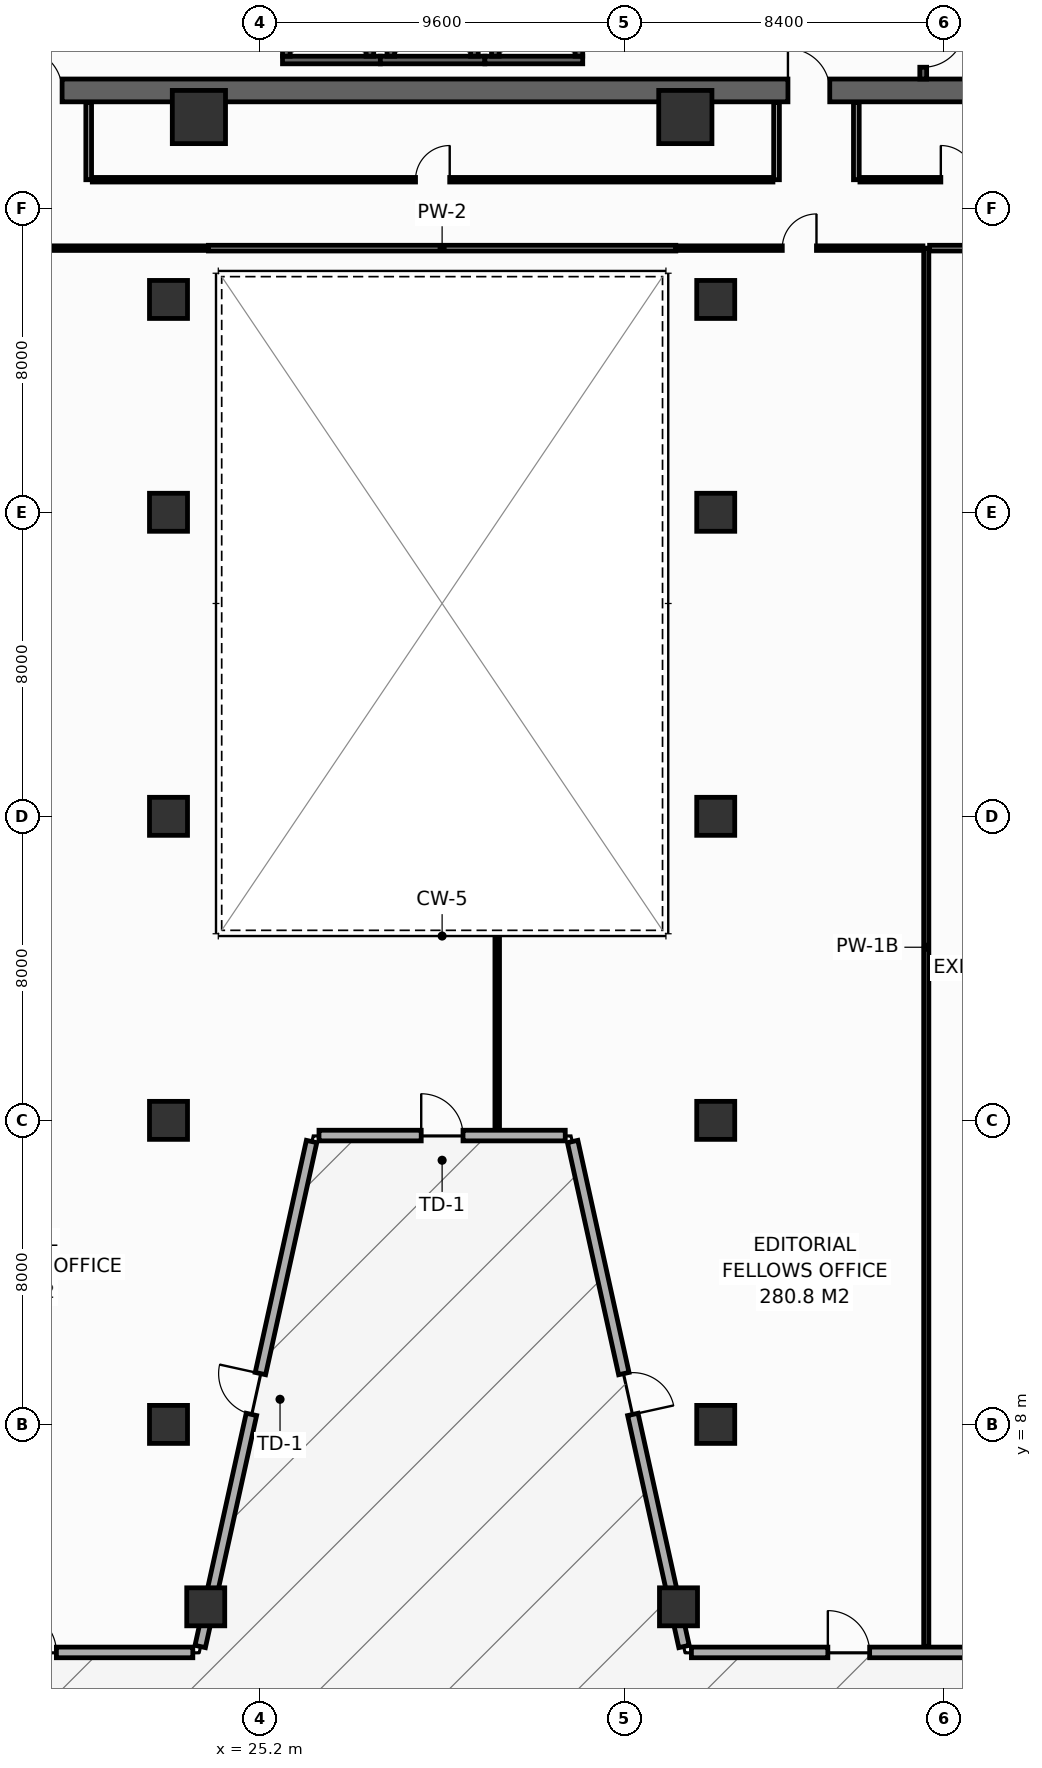
"""IFC4 building model, lengths in metres.
Left out: names, types, materials, properties, quantities, classifications, styles, units other than length and angle.
Written with IfcOpenShell. Run it as: python <this file> out.ifc"""

import sys

from ifc_helpers import new_model, si_unit, direction, frame, frame_2d, origin, origin_2d, place, context, subcontext, project, spatial, rectangle, hollow_rectangle, extrude, element, fill, save


model = new_model("IFC4")
c1 = context("Model", 3, precision=1e-05, world=origin(), true_north=direction((0.0, 1.0)))
c2 = subcontext(c1, "Body", "Model", "MODEL_VIEW")
j1 = project(units=[si_unit("LENGTHUNIT", "METRE"), si_unit("PLANEANGLEUNIT", "RADIAN")], contexts=[c1])
p1 = place(None, origin())
s1 = spatial("IfcSite", under=j1, at=p1, CompositionType="ELEMENT")
p2 = place(p1, origin())
s2 = spatial("IfcBuilding", under=s1, at=p2, CompositionType="ELEMENT")
p3 = place(p2, frame((0.0, 0.0, 27.6)))
s3 = spatial("IfcBuildingStorey", under=s2, at=p3, CompositionType="ELEMENT", Elevation=27.6)
p4 = place(p3, frame((13.5, 43.1, 0.0), z_axis=(0.0, 0.0, 1.0), x_axis=(1.0, 0.0, 0.0)))
e1 = element("IfcWall", 1, at=p4, inside=s3, PredefinedType="SHEAR", context=c2, shape_type="SweptSolid", body=[
    extrude(rectangle(XDim=32.9, YDim=0.6, at=frame_2d((16.45, 0.0))), origin(), (0.0, 0.0, 1.0), 5.15),
])
p5 = place(p4, frame((5.4, 0.0, 0.0)))
e2 = element("IfcOpeningElement", 2, at=p5, cuts=e1, PredefinedType="OPENING", context=c2, shape_type="SweptSolid", body=[
    extrude(rectangle(XDim=1.1, YDim=2.15, at=frame_2d((0.55, 1.075))), frame((0.0, 0.31, 0.0), z_axis=(0.0, -1.0, 0.0), x_axis=(1.0, 0.0, 0.0)), (0.0, 0.0, 1.0), 0.62),
])
p6 = place(p4, frame((25.6, 0.0, 0.0)))
e3 = element("IfcOpeningElement", 3, at=p6, cuts=e1, PredefinedType="OPENING", context=c2, shape_type="SweptSolid", body=[
    extrude(rectangle(XDim=1.1, YDim=2.15, at=frame_2d((0.55, 1.075))), frame((0.0, 0.31, 0.0), z_axis=(0.0, -1.0, 0.0), x_axis=(1.0, 0.0, 0.0)), (0.0, 0.0, 1.0), 0.62),
])
for number, where, z_axis, x_axis in (
    (4, (23.6, 42.4, 0.0), (0.0, 0.0, 1.0), (1.0, 0.0, 0.0)),
    (5, (36.4, 42.4, 0.0), (0.0, 0.0, 1.0), (1.0, 0.0, 0.0)),
):
    element("IfcColumn", number, at=place(p3, frame(where, z_axis=z_axis, x_axis=x_axis)), inside=s3, PredefinedType="COLUMN", context=c2, shape_type="SweptSolid", body=[
        extrude(hollow_rectangle(XDim=1.4, YDim=1.4, WallThickness=0.065, at=origin_2d()), origin(), (0.0, 0.0, 1.0), 5.4),
    ])
for number, where, z_axis, x_axis in (
    (6, (23.78, 3.2, 0.0), (0.0, 0.0, 1.0), (1.0, 0.0, 0.0)),
    (7, (36.22, 3.2, 0.0), (0.0, 0.0, 1.0), (1.0, 0.0, 0.0)),
    (8, (22.8, 8.0, 0.0), (0.0, 0.0, 1.0), (1.0, 0.0, 0.0)),
    (9, (37.2, 8.0, 0.0), (0.0, 0.0, 1.0), (1.0, 0.0, 0.0)),
    (10, (22.8, 16.0, 0.0), (0.0, 0.0, 1.0), (1.0, 0.0, 0.0)),
    (11, (37.2, 16.0, 0.0), (0.0, 0.0, 1.0), (1.0, 0.0, 0.0)),
    (12, (22.8, 24.0, 0.0), (0.0, 0.0, 1.0), (1.0, 0.0, 0.0)),
    (13, (37.2, 24.0, 0.0), (0.0, 0.0, 1.0), (1.0, 0.0, 0.0)),
    (14, (22.8, 32.0, 0.0), (0.0, 0.0, 1.0), (1.0, 0.0, 0.0)),
    (15, (37.2, 32.0, 0.0), (0.0, 0.0, 1.0), (1.0, 0.0, 0.0)),
    (16, (22.8, 37.6, 0.0), (0.0, 0.0, 1.0), (1.0, 0.0, 0.0)),
    (17, (37.2, 37.6, 0.0), (0.0, 0.0, 1.0), (1.0, 0.0, 0.0)),
):
    element("IfcColumn", number, at=place(p3, frame(where, z_axis=z_axis, x_axis=x_axis)), inside=s3, PredefinedType="COLUMN", context=c2, shape_type="SweptSolid", body=[
        extrude(hollow_rectangle(XDim=1.0, YDim=1.0, WallThickness=0.045, at=origin_2d()), origin(), (0.0, 0.0, 1.0), 5.4),
    ])
p7 = place(p3, frame((25.8, 43.9, 0.0), z_axis=(0.0, 0.0, 1.0), x_axis=(1.0, 0.0, 0.0)))
e18 = element("IfcWall", 18, at=p7, inside=s3, PredefinedType="SHEAR", context=c2, shape_type="SweptSolid", body=[
    extrude(rectangle(XDim=2.575, YDim=0.2, at=frame_2d((1.288, 0.0))), origin(), (0.0, 0.0, 1.0), 5.15),
])
for number, where, z_axis, x_axis in (
    (19, (25.9, 44.0, 0.0), (0.0, 0.0, 1.0), (0.0, 1.0, 0.0)),
    (20, (28.1, 44.0, 0.0), (0.0, 0.0, 1.0), (0.0, 1.0, 0.0)),
):
    element("IfcWall", number, at=place(p3, frame(where, z_axis=z_axis, x_axis=x_axis)), inside=s3, PredefinedType="SHEAR", context=c2, shape_type="SweptSolid", body=[
        extrude(rectangle(XDim=2.3, YDim=0.2, at=frame_2d((1.15, 0.0))), origin(), (0.0, 0.0, 1.0), 5.15),
    ])
p8 = place(p3, frame((28.375, 43.9, 0.0), z_axis=(0.0, 0.0, 1.0), x_axis=(1.0, 0.0, 0.0)))
e21 = element("IfcWall", 21, at=p8, inside=s3, PredefinedType="SHEAR", context=c2, shape_type="SweptSolid", body=[
    extrude(rectangle(XDim=2.75, YDim=0.2, at=frame_2d((1.375, 0.0))), origin(), (0.0, 0.0, 1.0), 5.15),
])
for number, where, z_axis, x_axis in (
    (22, (28.65, 44.0, 0.0), (0.0, 0.0, 1.0), (0.0, 1.0, 0.0)),
    (23, (30.85, 44.0, 0.0), (0.0, 0.0, 1.0), (0.0, 1.0, 0.0)),
):
    element("IfcWall", number, at=place(p3, frame(where, z_axis=z_axis, x_axis=x_axis)), inside=s3, PredefinedType="SHEAR", context=c2, shape_type="SweptSolid", body=[
        extrude(rectangle(XDim=2.3, YDim=0.2, at=frame_2d((1.15, 0.0))), origin(), (0.0, 0.0, 1.0), 5.15),
    ])
p9 = place(p3, frame((31.125, 43.9, 0.0), z_axis=(0.0, 0.0, 1.0), x_axis=(1.0, 0.0, 0.0)))
e24 = element("IfcWall", 24, at=p9, inside=s3, PredefinedType="SHEAR", context=c2, shape_type="SweptSolid", body=[
    extrude(rectangle(XDim=2.575, YDim=0.2, at=frame_2d((1.288, 0.0))), origin(), (0.0, 0.0, 1.0), 5.15),
])
for number, where, z_axis, x_axis in (
    (25, (31.4, 44.0, 0.0), (0.0, 0.0, 1.0), (0.0, 1.0, 0.0)),
    (26, (33.6, 44.0, 0.0), (0.0, 0.0, 1.0), (0.0, 1.0, 0.0)),
):
    element("IfcWall", number, at=place(p3, frame(where, z_axis=z_axis, x_axis=x_axis)), inside=s3, PredefinedType="SHEAR", context=c2, shape_type="SweptSolid", body=[
        extrude(rectangle(XDim=2.3, YDim=0.2, at=frame_2d((1.15, 0.0))), origin(), (0.0, 0.0, 1.0), 5.15),
    ])
p10 = place(p3, frame((42.66, 53.8, 0.0), z_axis=(0.0, 0.0, 1.0), x_axis=(0.0, -1.0, 0.0)))
e27 = element("IfcWall", 27, at=p10, inside=s3, PredefinedType="SHEAR", context=c2, shape_type="SweptSolid", body=[
    extrude(rectangle(XDim=10.4, YDim=0.18, at=frame_2d((5.2, 0.0))), origin(), (0.0, 0.0, 1.0), 5.15),
])
p11 = place(p10, frame((8.99, 0.0, 0.0)))
e28 = element("IfcOpeningElement", 28, at=p11, cuts=e27, PredefinedType="OPENING", context=c2, shape_type="SweptSolid", body=[
    extrude(rectangle(XDim=1.1, YDim=2.15, at=frame_2d((0.55, 1.075))), frame((0.0, 0.1, 0.0), z_axis=(0.0, -1.0, 0.0), x_axis=(1.0, 0.0, 0.0)), (0.0, 0.0, 1.0), 0.2),
])
p12 = place(p3, frame((15.16, 2.0, 0.0), z_axis=(0.0, 0.0, 1.0), x_axis=(1.0, 0.0, 0.0)))
e29 = element("IfcWall", 29, at=p12, inside=s3, PredefinedType="STANDARD", context=c2, shape_type="SweptSolid", body=[
    extrude(rectangle(XDim=8.28, YDim=0.28, at=frame_2d((4.14, 0.0))), origin(), (0.0, 0.0, 1.0), 5.15),
])
p13 = place(p12, frame((3.59, 0.0, 0.0)))
e30 = element("IfcOpeningElement", 30, at=p13, cuts=e29, PredefinedType="OPENING", context=c2, shape_type="SweptSolid", body=[
    extrude(rectangle(XDim=1.1, YDim=2.2, at=frame_2d((0.55, 1.1))), frame((0.0, 0.15, 0.0), z_axis=(0.0, -1.0, 0.0), x_axis=(1.0, 0.0, 0.0)), (0.0, 0.0, 1.0), 0.3),
])
p14 = place(p3, frame((23.635, 2.156, 0.0), z_axis=(0.0, 0.0, 1.0), x_axis=(0.215397075206, 0.976526548535, 0.0)))
e31 = element("IfcWall", 31, at=p14, inside=s3, PredefinedType="STANDARD", context=c2, shape_type="SweptSolid", body=[
    extrude(rectangle(XDim=13.607, YDim=0.28, at=frame_2d((6.803, 0.0))), origin(), (0.0, 0.0, 1.0), 5.15),
])
p15 = place(p14, frame((6.254, 0.0, 0.0)))
e32 = element("IfcOpeningElement", 32, at=p15, cuts=e31, PredefinedType="OPENING", context=c2, shape_type="SweptSolid", body=[
    extrude(rectangle(XDim=1.1, YDim=2.2, at=frame_2d((0.55, 1.1))), frame((0.0, 0.15, 0.0), z_axis=(0.0, -1.0, 0.0), x_axis=(1.0, 0.0, 0.0)), (0.0, 0.0, 1.0), 0.3),
])
p16 = place(p3, frame((26.76, 15.6, 0.0), z_axis=(0.0, 0.0, 1.0), x_axis=(1.0, 0.0, 0.0)))
e33 = element("IfcWall", 33, at=p16, inside=s3, PredefinedType="STANDARD", context=c2, shape_type="SweptSolid", body=[
    extrude(rectangle(XDim=6.48, YDim=0.28, at=frame_2d((3.24, 0.0))), origin(), (0.0, 0.0, 1.0), 5.15),
])
p17 = place(p16, frame((2.69, 0.0, 0.0)))
e34 = element("IfcOpeningElement", 34, at=p17, cuts=e33, PredefinedType="OPENING", context=c2, shape_type="SweptSolid", body=[
    extrude(rectangle(XDim=1.1, YDim=2.2, at=frame_2d((0.55, 1.1))), frame((0.0, 0.15, 0.0), z_axis=(0.0, -1.0, 0.0), x_axis=(1.0, 0.0, 0.0)), (0.0, 0.0, 1.0), 0.3),
])
p18 = place(p3, frame((33.435, 15.444, 0.0), z_axis=(0.0, 0.0, 1.0), x_axis=(0.215397075206, -0.976526548535, 0.0)))
e35 = element("IfcWall", 35, at=p18, inside=s3, PredefinedType="STANDARD", context=c2, shape_type="SweptSolid", body=[
    extrude(rectangle(XDim=13.607, YDim=0.28, at=frame_2d((6.803, 0.0))), origin(), (0.0, 0.0, 1.0), 5.15),
])
p19 = place(p18, frame((6.254, 0.0, 0.0)))
e36 = element("IfcOpeningElement", 36, at=p19, cuts=e35, PredefinedType="OPENING", context=c2, shape_type="SweptSolid", body=[
    extrude(rectangle(XDim=1.1, YDim=2.2, at=frame_2d((0.55, 1.1))), frame((0.0, 0.15, 0.0), z_axis=(0.0, -1.0, 0.0), x_axis=(1.0, 0.0, 0.0)), (0.0, 0.0, 1.0), 0.3),
])
p20 = place(p3, frame((36.56, 2.0, 0.0), z_axis=(0.0, 0.0, 1.0), x_axis=(1.0, 0.0, 0.0)))
e37 = element("IfcWall", 37, at=p20, inside=s3, PredefinedType="STANDARD", context=c2, shape_type="SweptSolid", body=[
    extrude(rectangle(XDim=8.28, YDim=0.28, at=frame_2d((4.14, 0.0))), origin(), (0.0, 0.0, 1.0), 5.15),
])
p21 = place(p20, frame((3.59, 0.0, 0.0)))
e38 = element("IfcOpeningElement", 38, at=p21, cuts=e37, PredefinedType="OPENING", context=c2, shape_type="SweptSolid", body=[
    extrude(rectangle(XDim=1.1, YDim=2.2, at=frame_2d((0.55, 1.1))), frame((0.0, 0.15, 0.0), z_axis=(0.0, -1.0, 0.0), x_axis=(1.0, 0.0, 0.0)), (0.0, 0.0, 1.0), 0.3),
])
for number, where, z_axis, x_axis in (
    (39, (20.7, 40.75, 0.0), (0.0, 0.0, 1.0), (0.0, 1.0, 0.0)),
    (40, (38.8, 40.75, 0.0), (0.0, 0.0, 1.0), (0.0, 1.0, 0.0)),
    (41, (40.9, 40.75, 0.0), (0.0, 0.0, 1.0), (0.0, 1.0, 0.0)),
):
    element("IfcWall", number, at=place(p3, frame(where, z_axis=z_axis, x_axis=x_axis)), inside=s3, PredefinedType="PARTITIONING", context=c2, shape_type="SweptSolid", body=[
        extrude(rectangle(XDim=2.03, YDim=0.15, at=frame_2d((1.015, 0.0))), origin(), (0.0, 0.0, 1.0), 5.15),
    ])
p22 = place(p3, frame((20.795, 40.75, 0.0), z_axis=(0.0, 0.0, 1.0), x_axis=(1.0, 0.0, 0.0)))
e42 = element("IfcWall", 42, at=p22, inside=s3, PredefinedType="PARTITIONING", context=c2, shape_type="SweptSolid", body=[
    extrude(rectangle(XDim=17.91, YDim=0.12, at=frame_2d((8.955, 0.0))), origin(), (0.0, 0.0, 1.0), 4.235),
])
p23 = place(p22, frame((8.505, 0.0, 0.0)))
e43 = element("IfcOpeningElement", 43, at=p23, cuts=e42, PredefinedType="OPENING", context=c2, shape_type="SweptSolid", body=[
    extrude(rectangle(XDim=0.9, YDim=2.1, at=frame_2d((0.45, 1.05))), frame((0.0, 0.07, 0.0), z_axis=(0.0, -1.0, 0.0), x_axis=(1.0, 0.0, 0.0)), (0.0, 0.0, 1.0), 0.14),
])
p24 = place(p3, frame((40.995, 40.75, 0.0), z_axis=(0.0, 0.0, 1.0), x_axis=(1.0, 0.0, 0.0)))
e44 = element("IfcWall", 44, at=p24, inside=s3, PredefinedType="PARTITIONING", context=c2, shape_type="SweptSolid", body=[
    extrude(rectangle(XDim=5.155, YDim=0.12, at=frame_2d((2.577, 0.0))), origin(), (0.0, 0.0, 1.0), 5.15),
])
p25 = place(p24, frame((2.128, 0.0, 0.0)))
e45 = element("IfcOpeningElement", 45, at=p25, cuts=e44, PredefinedType="OPENING", context=c2, shape_type="SweptSolid", body=[
    extrude(rectangle(XDim=0.9, YDim=2.1, at=frame_2d((0.45, 1.05))), frame((0.0, 0.07, 0.0), z_axis=(0.0, -1.0, 0.0), x_axis=(1.0, 0.0, 0.0)), (0.0, 0.0, 1.0), 0.14),
])
p26 = place(p3, frame((42.74, 2.16, 0.0), z_axis=(0.0, 0.0, 1.0), x_axis=(0.0, 1.0, 0.0)))
e46 = element("IfcWall", 46, at=p26, inside=s3, PredefinedType="PARTITIONING", context=c2, shape_type="SweptSolid", body=[
    extrude(rectangle(XDim=36.79, YDim=0.135, at=frame_2d((18.395, 0.0))), origin(), (0.0, 0.0, 1.0), 4.235),
])
p27 = place(p3, frame((31.45, 15.76, 0.0), z_axis=(0.0, 0.0, 1.0), x_axis=(0.0, 1.0, 0.0)))
e47 = element("IfcWall", 47, at=p27, inside=s3, PredefinedType="PARTITIONING", context=c2, shape_type="SweptSolid", body=[
    extrude(rectangle(XDim=5.02, YDim=0.12, at=frame_2d((2.51, 0.0))), origin(), (0.0, 0.0, 1.0), 2.935),
])
p28 = place(p3, frame((14.48, 38.95, 0.0), z_axis=(0.0, 0.0, 1.0), x_axis=(1.0, 0.0, 0.0)))
e48 = element("IfcWall", 48, at=p28, inside=s3, PredefinedType="PARTITIONING", context=c2, shape_type="SweptSolid", body=[
    extrude(rectangle(XDim=9.37, YDim=0.12, at=frame_2d((4.685, 0.0))), origin(), (0.0, 0.0, 1.0), 4.235),
])
p29 = place(p28, frame((4.235, 0.0, 0.0)))
e49 = element("IfcOpeningElement", 49, at=p29, cuts=e48, PredefinedType="OPENING", context=c2, shape_type="SweptSolid", body=[
    extrude(rectangle(XDim=0.9, YDim=2.1, at=frame_2d((0.45, 1.05))), frame((0.0, 0.07, 0.0), z_axis=(0.0, -1.0, 0.0), x_axis=(1.0, 0.0, 0.0)), (0.0, 0.0, 1.0), 0.14),
])
p30 = place(p3, frame((23.85, 38.95, 0.0), z_axis=(0.0, 0.0, 1.0), x_axis=(1.0, 0.0, 0.0)))
e50 = element("IfcWall", 50, at=p30, inside=s3, PredefinedType="PARTITIONING", context=c2, shape_type="SweptSolid", body=[
    extrude(rectangle(XDim=12.3, YDim=0.15, at=frame_2d((6.15, 0.0))), origin(), (0.0, 0.0, 1.0), 5.15),
])
p31 = place(p3, frame((36.15, 38.95, 0.0), z_axis=(0.0, 0.0, 1.0), x_axis=(1.0, 0.0, 0.0)))
e51 = element("IfcWall", 51, at=p31, inside=s3, PredefinedType="PARTITIONING", context=c2, shape_type="SweptSolid", body=[
    extrude(rectangle(XDim=6.503, YDim=0.12, at=frame_2d((3.251, 0.0))), origin(), (0.0, 0.0, 1.0), 4.235),
])
p32 = place(p31, frame((2.801, 0.0, 0.0)))
e52 = element("IfcOpeningElement", 52, at=p32, cuts=e51, PredefinedType="OPENING", context=c2, shape_type="SweptSolid", body=[
    extrude(rectangle(XDim=0.9, YDim=2.1, at=frame_2d((0.45, 1.05))), frame((0.0, 0.07, 0.0), z_axis=(0.0, -1.0, 0.0), x_axis=(1.0, 0.0, 0.0)), (0.0, 0.0, 1.0), 0.14),
])
p33 = place(p3, frame((42.827, 38.95, 0.0), z_axis=(0.0, 0.0, 1.0), x_axis=(1.0, 0.0, 0.0)))
e53 = element("IfcWall", 53, at=p33, inside=s3, PredefinedType="PARTITIONING", context=c2, shape_type="SweptSolid", body=[
    extrude(rectangle(XDim=5.555, YDim=0.15, at=frame_2d((2.778, 0.0))), origin(), (0.0, 0.0, 1.0), 5.15),
])
p34 = place(p33, frame((2.252, 0.0, 0.0)))
e54 = element("IfcOpeningElement", 54, at=p34, cuts=e53, PredefinedType="OPENING", context=c2, shape_type="SweptSolid", body=[
    extrude(rectangle(XDim=1.05, YDim=2.15, at=frame_2d((0.525, 1.075))), frame((0.0, 0.085, 0.0), z_axis=(0.0, -1.0, 0.0), x_axis=(1.0, 0.0, 0.0)), (0.0, 0.0, 1.0), 0.17),
])
p35 = place(p11, origin())
e55 = element("IfcDoor", 55, at=p35, inside=s3, OperationType="SINGLE_SWING_LEFT", PredefinedType="DOOR", context=c2, shape_type="SweptSolid", body=[
    extrude(rectangle(XDim=1.1, YDim=2.15, at=frame_2d((0.55, 1.075))), frame((0.0, 0.025, 0.0), z_axis=(0.0, -1.0, 0.0), x_axis=(1.0, 0.0, 0.0)), (0.0, 0.0, 1.0), 0.05),
])
fill(e28, e55)
p36 = place(p5, origin())
e56 = element("IfcDoor", 56, at=p36, inside=s3, OperationType="SINGLE_SWING_LEFT", PredefinedType="DOOR", context=c2, shape_type="SweptSolid", body=[
    extrude(rectangle(XDim=1.1, YDim=2.15, at=frame_2d((0.55, 1.075))), frame((0.0, 0.025, 0.0), z_axis=(0.0, -1.0, 0.0), x_axis=(1.0, 0.0, 0.0)), (0.0, 0.0, 1.0), 0.05),
])
fill(e2, e56)
p37 = place(p6, origin())
e57 = element("IfcDoor", 57, at=p37, inside=s3, OperationType="SINGLE_SWING_LEFT", PredefinedType="DOOR", context=c2, shape_type="SweptSolid", body=[
    extrude(rectangle(XDim=1.1, YDim=2.15, at=frame_2d((0.55, 1.075))), frame((0.0, 0.025, 0.0), z_axis=(0.0, -1.0, 0.0), x_axis=(1.0, 0.0, 0.0)), (0.0, 0.0, 1.0), 0.05),
])
fill(e3, e57)
p38 = place(p13, origin())
e58 = element("IfcDoor", 58, at=p38, inside=s3, OperationType="SINGLE_SWING_LEFT", PredefinedType="DOOR", context=c2, shape_type="SweptSolid", body=[
    extrude(rectangle(XDim=1.1, YDim=2.2, at=frame_2d((0.55, 1.1))), frame((0.0, 0.025, 0.0), z_axis=(0.0, -1.0, 0.0), x_axis=(1.0, 0.0, 0.0)), (0.0, 0.0, 1.0), 0.05),
])
fill(e30, e58)
p39 = place(p15, origin())
e59 = element("IfcDoor", 59, at=p39, inside=s3, OperationType="SINGLE_SWING_RIGHT", PredefinedType="DOOR", context=c2, shape_type="SweptSolid", body=[
    extrude(rectangle(XDim=1.1, YDim=2.2, at=frame_2d((0.55, 1.1))), frame((0.0, 0.025, 0.0), z_axis=(0.0, -1.0, 0.0), x_axis=(1.0, 0.0, 0.0)), (0.0, 0.0, 1.0), 0.05),
])
fill(e32, e59)
p40 = place(p17, origin())
e60 = element("IfcDoor", 60, at=p40, inside=s3, OperationType="SINGLE_SWING_LEFT", PredefinedType="DOOR", context=c2, shape_type="SweptSolid", body=[
    extrude(rectangle(XDim=1.1, YDim=2.2, at=frame_2d((0.55, 1.1))), frame((0.0, 0.025, 0.0), z_axis=(0.0, -1.0, 0.0), x_axis=(1.0, 0.0, 0.0)), (0.0, 0.0, 1.0), 0.05),
])
fill(e34, e60)
p41 = place(p19, origin())
e61 = element("IfcDoor", 61, at=p41, inside=s3, OperationType="SINGLE_SWING_RIGHT", PredefinedType="DOOR", context=c2, shape_type="SweptSolid", body=[
    extrude(rectangle(XDim=1.1, YDim=2.2, at=frame_2d((0.55, 1.1))), frame((0.0, 0.025, 0.0), z_axis=(0.0, -1.0, 0.0), x_axis=(1.0, 0.0, 0.0)), (0.0, 0.0, 1.0), 0.05),
])
fill(e36, e61)
p42 = place(p21, origin())
e62 = element("IfcDoor", 62, at=p42, inside=s3, OperationType="SINGLE_SWING_LEFT", PredefinedType="DOOR", context=c2, shape_type="SweptSolid", body=[
    extrude(rectangle(XDim=1.1, YDim=2.2, at=frame_2d((0.55, 1.1))), frame((0.0, 0.025, 0.0), z_axis=(0.0, -1.0, 0.0), x_axis=(1.0, 0.0, 0.0)), (0.0, 0.0, 1.0), 0.05),
])
fill(e38, e62)
p43 = place(p23, origin())
e63 = element("IfcDoor", 63, at=p43, inside=s3, OperationType="SINGLE_SWING_RIGHT", PredefinedType="DOOR", context=c2, shape_type="SweptSolid", body=[
    extrude(rectangle(XDim=0.9, YDim=2.1, at=frame_2d((0.45, 1.05))), frame((0.0, 0.025, 0.0), z_axis=(0.0, -1.0, 0.0), x_axis=(1.0, 0.0, 0.0)), (0.0, 0.0, 1.0), 0.05),
])
fill(e43, e63)
p44 = place(p25, origin())
e64 = element("IfcDoor", 64, at=p44, inside=s3, OperationType="SINGLE_SWING_LEFT", PredefinedType="DOOR", context=c2, shape_type="SweptSolid", body=[
    extrude(rectangle(XDim=0.9, YDim=2.1, at=frame_2d((0.45, 1.05))), frame((0.0, 0.025, 0.0), z_axis=(0.0, -1.0, 0.0), x_axis=(1.0, 0.0, 0.0)), (0.0, 0.0, 1.0), 0.05),
])
fill(e45, e64)
p45 = place(p32, origin())
e65 = element("IfcDoor", 65, at=p45, inside=s3, OperationType="SINGLE_SWING_RIGHT", PredefinedType="DOOR", context=c2, shape_type="SweptSolid", body=[
    extrude(rectangle(XDim=0.9, YDim=2.1, at=frame_2d((0.45, 1.05))), frame((0.0, 0.025, 0.0), z_axis=(0.0, -1.0, 0.0), x_axis=(1.0, 0.0, 0.0)), (0.0, 0.0, 1.0), 0.05),
])
fill(e52, e65)
save(model, sys.argv[1])
